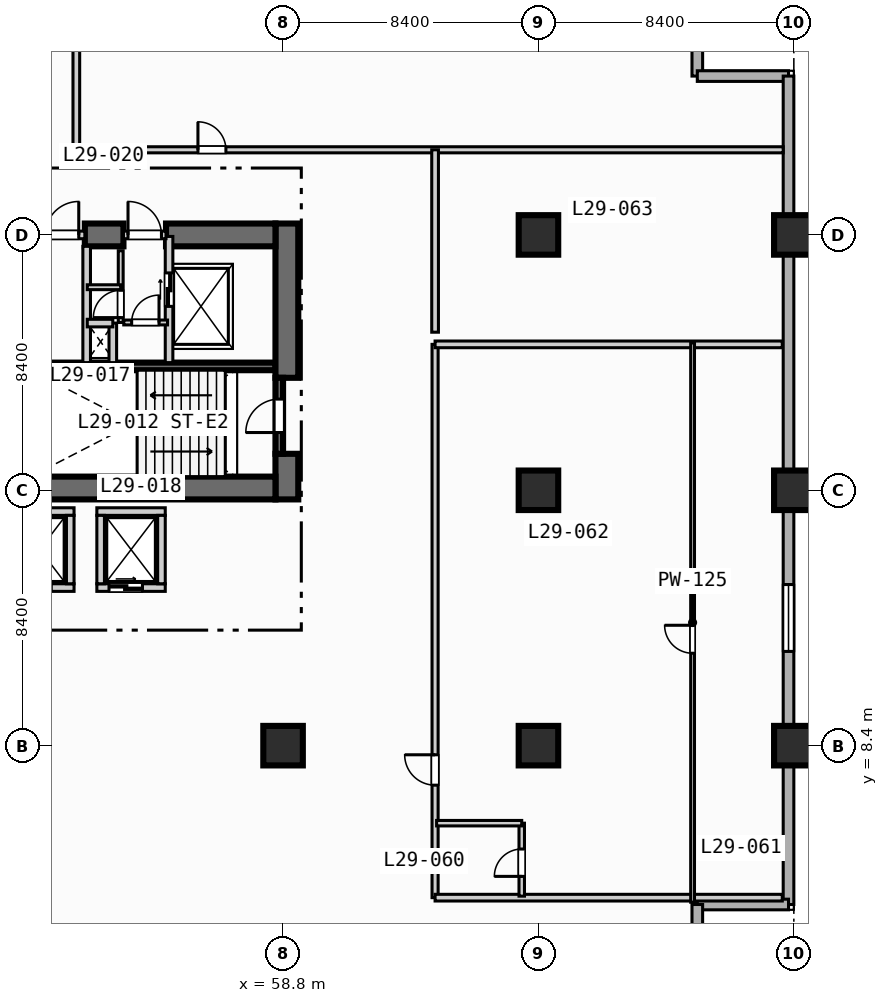
"""IFC4 building model, lengths in metres.
Left out: names, types, materials, properties, quantities, classifications, styles, units other than length and angle.
Written with IfcOpenShell. Run it as: python <this file> out.ifc"""

import sys

from ifc_helpers import new_model, si_unit, direction, frame, frame_2d, origin, origin_2d, place, context, subcontext, project, spatial, rectangle, extrude, element, fill, save


model = new_model("IFC4")
c1 = context("Model", 3, precision=1e-05, world=origin(), true_north=direction((0.0, 1.0)))
c2 = subcontext(c1, "Body", "Model", "MODEL_VIEW")
j1 = project(units=[si_unit("LENGTHUNIT", "METRE"), si_unit("PLANEANGLEUNIT", "RADIAN")], contexts=[c1])
p1 = place(None, origin())
s1 = spatial("IfcSite", under=j1, at=p1, CompositionType="ELEMENT")
p2 = place(p1, origin())
s2 = spatial("IfcBuilding", under=s1, at=p2, CompositionType="ELEMENT")
p3 = place(p2, frame((0.0, 0.0, 122.8)))
s3 = spatial("IfcBuildingStorey", under=s2, at=p3, CompositionType="ELEMENT", Elevation=122.8)
p4 = place(p3, frame((50.5, 20.875, 0.0), z_axis=(0.0, 0.0, 1.0), x_axis=(1.0, 0.0, 0.0)))
e1 = element("IfcWall", 1, at=p4, inside=s3, PredefinedType="SOLIDWALL", context=c2, shape_type="SweptSolid", body=[
    extrude(rectangle(XDim=8.05, YDim=0.25, at=frame_2d((4.025, 0.0))), origin(), (0.0, 0.0, 1.0), 3.55),
])
p5 = place(p3, frame((58.925, 16.5, 0.0), z_axis=(0.0, 0.0, 1.0), x_axis=(0.0, 1.0, 0.0)))
e2 = element("IfcWall", 2, at=p5, inside=s3, PredefinedType="SHEAR", context=c2, shape_type="SweptSolid", body=[
    extrude(rectangle(XDim=1.5, YDim=0.75, at=frame_2d((0.75, 0.0))), origin(), (0.0, 0.0, 1.0), 3.55),
])
p6 = place(p3, frame((58.925, 20.5, 0.0), z_axis=(0.0, 0.0, 1.0), x_axis=(0.0, 1.0, 0.0)))
e3 = element("IfcWall", 3, at=p6, inside=s3, PredefinedType="SHEAR", context=c2, shape_type="SweptSolid", body=[
    extrude(rectangle(XDim=5.075, YDim=0.75, at=frame_2d((2.538, 0.0))), origin(), (0.0, 0.0, 1.0), 3.55),
])
p7 = place(p3, frame((42.2, 16.875, 0.0), z_axis=(0.0, 0.0, 1.0), x_axis=(1.0, 0.0, 0.0)))
e4 = element("IfcWall", 4, at=p7, inside=s3, PredefinedType="SHEAR", context=c2, shape_type="SweptSolid", body=[
    extrude(rectangle(XDim=16.35, YDim=0.75, at=frame_2d((8.175, 0.0))), origin(), (0.0, 0.0, 1.0), 3.55),
])
p8 = place(p3, frame((52.28, 25.2, 0.0), z_axis=(0.0, 0.0, 1.0), x_axis=(1.0, 0.0, 0.0)))
e5 = element("IfcWall", 5, at=p8, inside=s3, PredefinedType="SHEAR", context=c2, shape_type="SweptSolid", body=[
    extrude(rectangle(XDim=1.27, YDim=0.75, at=frame_2d((0.635, 0.0))), origin(), (0.0, 0.0, 1.0), 3.55),
])
p9 = place(p3, frame((54.95, 25.2, 0.0), z_axis=(0.0, 0.0, 1.0), x_axis=(1.0, 0.0, 0.0)))
e6 = element("IfcWall", 6, at=p9, inside=s3, PredefinedType="SHEAR", context=c2, shape_type="SweptSolid", body=[
    extrude(rectangle(XDim=3.6, YDim=0.75, at=frame_2d((1.8, 0.0))), origin(), (0.0, 0.0, 1.0), 3.55),
])
for number, where, z_axis, x_axis in (
    (7, (58.8, 8.4, 0.0), (0.0, 0.0, 1.0), (1.0, 0.0, 0.0)),
    (8, (67.2, 8.4, 0.0), (0.0, 0.0, 1.0), (1.0, 0.0, 0.0)),
    (9, (67.2, 16.8, 0.0), (0.0, 0.0, 1.0), (1.0, 0.0, 0.0)),
    (10, (67.2, 25.2, 0.0), (0.0, 0.0, 1.0), (1.0, 0.0, 0.0)),
    (11, (75.6, 8.4, 0.0), (0.0, 0.0, 1.0), (1.0, 0.0, 0.0)),
    (12, (75.6, 16.8, 0.0), (0.0, 0.0, 1.0), (1.0, 0.0, 0.0)),
    (13, (75.6, 25.2, 0.0), (0.0, 0.0, 1.0), (1.0, 0.0, 0.0)),
):
    element("IfcColumn", number, at=place(p3, frame(where, z_axis=z_axis, x_axis=x_axis)), inside=s3, PredefinedType="COLUMN", context=c2, shape_type="SweptSolid", body=[
        extrude(rectangle(XDim=1.3, YDim=1.3, at=origin_2d()), origin(), (0.0, 0.0, 1.0), 3.8),
    ])
for number, where, z_axis, x_axis in (
    (14, (72.425, 33.425, 0.0), (0.0, 0.0, 1.0), (0.0, -1.0, 0.0)),
    (15, (72.425, 30.425, 0.0), (0.0, 0.0, 1.0), (1.0, 0.0, 0.0)),
):
    element("IfcWall", number, at=place(p3, frame(where, z_axis=z_axis, x_axis=x_axis)), inside=s3, PredefinedType="STANDARD", context=c2, shape_type="SweptSolid", body=[
        extrude(rectangle(XDim=3.0, YDim=0.35, at=frame_2d((1.5, 0.0))), origin(), (0.0, 0.0, 1.0), 3.55),
    ])
p10 = place(p3, frame((75.425, 30.425, 0.0), z_axis=(0.0, 0.0, 1.0), x_axis=(0.0, -1.0, 0.0)))
e16 = element("IfcWall", 16, at=p10, inside=s3, PredefinedType="STANDARD", context=c2, shape_type="SweptSolid", body=[
    extrude(rectangle(XDim=27.25, YDim=0.35, at=frame_2d((13.625, 0.0))), origin(), (0.0, 0.0, 1.0), 3.55),
])
p11 = place(p10, frame((16.725, 0.0, 0.85)))
e17 = element("IfcOpeningElement", 17, at=p11, cuts=e16, PredefinedType="OPENING", context=c2, shape_type="SweptSolid", body=[
    extrude(rectangle(XDim=2.2, YDim=1.8, at=frame_2d((1.1, 0.9))), frame((0.0, 0.185, 0.0), z_axis=(0.0, -1.0, 0.0), x_axis=(1.0, 0.0, 0.0)), (0.0, 0.0, 1.0), 0.37),
])
for number, where, z_axis, x_axis in (
    (18, (75.425, 3.175, 0.0), (0.0, 0.0, 1.0), (-1.0, 0.0, 0.0)),
    (19, (72.425, 3.175, 0.0), (0.0, 0.0, 1.0), (0.0, -1.0, 0.0)),
):
    element("IfcWall", number, at=place(p3, frame(where, z_axis=z_axis, x_axis=x_axis)), inside=s3, PredefinedType="STANDARD", context=c2, shape_type="SweptSolid", body=[
        extrude(rectangle(XDim=3.0, YDim=0.35, at=frame_2d((1.5, 0.0))), origin(), (0.0, 0.0, 1.0), 3.55),
    ])
p12 = place(p3, frame((58.675, 18.0, 0.0), z_axis=(0.0, 0.0, 1.0), x_axis=(0.0, 1.0, 0.0)))
e20 = element("IfcWall", 20, at=p12, inside=s3, PredefinedType="SOLIDWALL", context=c2, shape_type="SweptSolid", body=[
    extrude(rectangle(XDim=2.5, YDim=0.25, at=frame_2d((1.25, 0.0))), origin(), (0.0, 0.0, 1.0), 3.55),
])
p13 = place(p12, frame((0.7, 0.0, 0.0)))
e21 = element("IfcOpeningElement", 21, at=p13, cuts=e20, PredefinedType="OPENING", context=c2, shape_type="SweptSolid", body=[
    extrude(rectangle(XDim=1.1, YDim=2.15, at=frame_2d((0.55, 1.075))), frame((0.0, 0.135, 0.0), z_axis=(0.0, -1.0, 0.0), x_axis=(1.0, 0.0, 0.0)), (0.0, 0.0, 1.0), 0.27),
])
p14 = place(p3, frame((50.8, 25.2, 0.0), z_axis=(0.0, 0.0, 1.0), x_axis=(1.0, 0.0, 0.0)))
e22 = element("IfcWall", 22, at=p14, inside=s3, PredefinedType="SOLIDWALL", context=c2, shape_type="SweptSolid", body=[
    extrude(rectangle(XDim=1.48, YDim=0.25, at=frame_2d((0.74, 0.0))), origin(), (0.0, 0.0, 1.0), 3.55),
])
p15 = place(p14, frame((0.18, 0.0, 0.0)))
e23 = element("IfcOpeningElement", 23, at=p15, cuts=e22, PredefinedType="OPENING", context=c2, shape_type="SweptSolid", body=[
    extrude(rectangle(XDim=1.1, YDim=2.15, at=frame_2d((0.55, 1.075))), frame((0.0, 0.135, 0.0), z_axis=(0.0, -1.0, 0.0), x_axis=(1.0, 0.0, 0.0)), (0.0, 0.0, 1.0), 0.27),
])
p16 = place(p3, frame((52.34, 21.0, 0.0), z_axis=(0.0, 0.0, 1.0), x_axis=(0.0, 1.0, 0.0)))
e24 = element("IfcWall", 24, at=p16, inside=s3, PredefinedType="SOLIDWALL", context=c2, shape_type="SweptSolid", body=[
    extrude(rectangle(XDim=3.825, YDim=0.25, at=frame_2d((1.913, 0.0))), origin(), (0.0, 0.0, 1.0), 3.55),
])
p17 = place(p3, frame((55.05, 21.0, 0.0), z_axis=(0.0, 0.0, 1.0), x_axis=(0.0, 1.0, 0.0)))
e25 = element("IfcWall", 25, at=p17, inside=s3, PredefinedType="SOLIDWALL", context=c2, shape_type="SweptSolid", body=[
    extrude(rectangle(XDim=4.15, YDim=0.25, at=frame_2d((2.075, 0.0))), origin(), (0.0, 0.0, 1.0), 3.55),
])
p18 = place(p17, frame((1.85, 0.0, 0.0)))
e26 = element("IfcOpeningElement", 26, at=p18, cuts=e25, PredefinedType="OPENING", context=c2, shape_type="SweptSolid", body=[
    extrude(rectangle(XDim=1.1, YDim=2.15, at=frame_2d((0.55, 1.075))), frame((0.0, 0.135, 0.0), z_axis=(0.0, -1.0, 0.0), x_axis=(1.0, 0.0, 0.0)), (0.0, 0.0, 1.0), 0.27),
])
p19 = place(p3, frame((53.55, 25.2, 0.0), z_axis=(0.0, 0.0, 1.0), x_axis=(1.0, 0.0, 0.0)))
e27 = element("IfcWall", 27, at=p19, inside=s3, PredefinedType="SOLIDWALL", context=c2, shape_type="SweptSolid", body=[
    extrude(rectangle(XDim=1.4, YDim=0.25, at=frame_2d((0.7, 0.0))), origin(), (0.0, 0.0, 1.0), 3.55),
])
p20 = place(p19, frame((0.15, 0.0, 0.0)))
e28 = element("IfcOpeningElement", 28, at=p20, cuts=e27, PredefinedType="OPENING", context=c2, shape_type="SweptSolid", body=[
    extrude(rectangle(XDim=1.1, YDim=2.15, at=frame_2d((0.55, 1.075))), frame((0.0, 0.135, 0.0), z_axis=(0.0, -1.0, 0.0), x_axis=(1.0, 0.0, 0.0)), (0.0, 0.0, 1.0), 0.27),
])
p21 = place(p3, frame((53.2, 21.0, 0.0), z_axis=(0.0, 0.0, 1.0), x_axis=(0.0, 1.0, 0.0)))
e29 = element("IfcWall", 29, at=p21, inside=s3, PredefinedType="SOLIDWALL", context=c2, shape_type="SweptSolid", body=[
    extrude(rectangle(XDim=1.3, YDim=0.25, at=frame_2d((0.65, 0.0))), origin(), (0.0, 0.0, 1.0), 3.55),
])
p22 = place(p3, frame((52.36, 22.3, 0.0), z_axis=(0.0, 0.0, 1.0), x_axis=(1.0, 0.0, 0.0)))
e30 = element("IfcWall", 30, at=p22, inside=s3, PredefinedType="SOLIDWALL", context=c2, shape_type="SweptSolid", body=[
    extrude(rectangle(XDim=0.84, YDim=0.25, at=frame_2d((0.42, 0.0))), origin(), (0.0, 0.0, 1.0), 3.55),
])
p23 = place(p3, frame((53.56, 22.32, 0.0), z_axis=(0.0, 0.0, 1.0), x_axis=(1.0, 0.0, 0.0)))
e31 = element("IfcWall", 31, at=p23, inside=s3, PredefinedType="PARTITIONING", context=c2, shape_type="SweptSolid", body=[
    extrude(rectangle(XDim=1.44, YDim=0.16, at=frame_2d((0.72, 0.0))), origin(), (0.0, 0.0, 1.0), 3.55),
])
p24 = place(p23, frame((0.26, 0.0, 0.0)))
e32 = element("IfcOpeningElement", 32, at=p24, cuts=e31, PredefinedType="OPENING", context=c2, shape_type="SweptSolid", body=[
    extrude(rectangle(XDim=0.9, YDim=2.1, at=frame_2d((0.45, 1.05))), frame((0.0, 0.09, 0.0), z_axis=(0.0, -1.0, 0.0), x_axis=(1.0, 0.0, 0.0)), (0.0, 0.0, 1.0), 0.18),
])
p25 = place(p3, frame((53.46, 22.32, 0.0), z_axis=(0.0, 0.0, 1.0), x_axis=(0.0, 1.0, 0.0)))
e33 = element("IfcWall", 33, at=p25, inside=s3, PredefinedType="PARTITIONING", context=c2, shape_type="SweptSolid", body=[
    extrude(rectangle(XDim=2.36, YDim=0.16, at=frame_2d((1.18, 0.0))), origin(), (0.0, 0.0, 1.0), 3.55),
])
p26 = place(p25, frame((0.16, 0.0, 0.0)))
e34 = element("IfcOpeningElement", 34, at=p26, cuts=e33, PredefinedType="OPENING", context=c2, shape_type="SweptSolid", body=[
    extrude(rectangle(XDim=0.9, YDim=2.1, at=frame_2d((0.45, 1.05))), frame((0.0, 0.09, 0.0), z_axis=(0.0, -1.0, 0.0), x_axis=(1.0, 0.0, 0.0)), (0.0, 0.0, 1.0), 0.18),
])
p27 = place(p3, frame((52.36, 23.48, 0.0), z_axis=(0.0, 0.0, 1.0), x_axis=(1.0, 0.0, 0.0)))
e35 = element("IfcWall", 35, at=p27, inside=s3, PredefinedType="PARTITIONING", context=c2, shape_type="SweptSolid", body=[
    extrude(rectangle(XDim=1.1, YDim=0.16, at=frame_2d((0.55, 0.0))), origin(), (0.0, 0.0, 1.0), 3.55),
])
p28 = place(p3, frame((49.675, 13.6, 0.0), z_axis=(0.0, 0.0, 1.0), x_axis=(1.0, 0.0, 0.0)))
e36 = element("IfcWall", 36, at=p28, inside=s3, PredefinedType="SOLIDWALL", context=c2, shape_type="SweptSolid", body=[
    extrude(rectangle(XDim=2.25, YDim=0.25, at=frame_2d((1.125, 0.0))), origin(), (0.0, 0.0, 1.0), 3.55),
])
p29 = place(p28, frame((0.4, 0.0, 0.0)))
e37 = element("IfcOpeningElement", 37, at=p29, cuts=e36, PredefinedType="OPENING", context=c2, shape_type="SweptSolid", body=[
    extrude(rectangle(XDim=1.1, YDim=2.15, at=frame_2d((0.55, 1.075))), frame((0.0, 0.135, 0.0), z_axis=(0.0, -1.0, 0.0), x_axis=(1.0, 0.0, 0.0)), (0.0, 0.0, 1.0), 0.27),
])
for number, where, z_axis, x_axis in (
    (38, (49.675, 16.1, 0.0), (0.0, 0.0, 1.0), (1.0, 0.0, 0.0)),
    (39, (51.8, 13.725, 0.0), (0.0, 0.0, 1.0), (0.0, 1.0, 0.0)),
):
    element("IfcWall", number, at=place(p3, frame(where, z_axis=z_axis, x_axis=x_axis)), inside=s3, PredefinedType="SOLIDWALL", context=c2, shape_type="SweptSolid", body=[
        extrude(rectangle(XDim=2.25, YDim=0.25, at=frame_2d((1.125, 0.0))), origin(), (0.0, 0.0, 1.0), 3.55),
    ])
p30 = place(p3, frame((52.675, 13.6, 0.0), z_axis=(0.0, 0.0, 1.0), x_axis=(1.0, 0.0, 0.0)))
e40 = element("IfcWall", 40, at=p30, inside=s3, PredefinedType="SOLIDWALL", context=c2, shape_type="SweptSolid", body=[
    extrude(rectangle(XDim=2.25, YDim=0.25, at=frame_2d((1.125, 0.0))), origin(), (0.0, 0.0, 1.0), 3.55),
])
p31 = place(p30, frame((0.4, 0.0, 0.0)))
e41 = element("IfcOpeningElement", 41, at=p31, cuts=e40, PredefinedType="OPENING", context=c2, shape_type="SweptSolid", body=[
    extrude(rectangle(XDim=1.1, YDim=2.15, at=frame_2d((0.55, 1.075))), frame((0.0, 0.135, 0.0), z_axis=(0.0, -1.0, 0.0), x_axis=(1.0, 0.0, 0.0)), (0.0, 0.0, 1.0), 0.27),
])
for number, where, z_axis, x_axis in (
    (42, (52.675, 16.1, 0.0), (0.0, 0.0, 1.0), (1.0, 0.0, 0.0)),
    (43, (52.8, 13.725, 0.0), (0.0, 0.0, 1.0), (0.0, 1.0, 0.0)),
    (44, (54.8, 13.725, 0.0), (0.0, 0.0, 1.0), (0.0, 1.0, 0.0)),
):
    element("IfcWall", number, at=place(p3, frame(where, z_axis=z_axis, x_axis=x_axis)), inside=s3, PredefinedType="SOLIDWALL", context=c2, shape_type="SweptSolid", body=[
        extrude(rectangle(XDim=2.25, YDim=0.25, at=frame_2d((1.125, 0.0))), origin(), (0.0, 0.0, 1.0), 3.55),
    ])
p32 = place(p3, frame((63.8, 3.4, 0.0), z_axis=(0.0, 0.0, 1.0), x_axis=(0.0, 1.0, 0.0)))
e45 = element("IfcWall", 45, at=p32, inside=s3, PredefinedType="PARTITIONING", context=c2, shape_type="SweptSolid", body=[
    extrude(rectangle(XDim=18.2, YDim=0.2, at=frame_2d((9.1, 0.0))), origin(), (0.0, 0.0, 1.0), 3.55),
])
p33 = place(p32, frame((3.7, 0.0, 0.0)))
e46 = element("IfcOpeningElement", 46, at=p33, cuts=e45, PredefinedType="OPENING", context=c2, shape_type="SweptSolid", body=[
    extrude(rectangle(XDim=1.0, YDim=2.15, at=frame_2d((0.5, 1.075))), frame((0.0, 0.11, 0.0), z_axis=(0.0, -1.0, 0.0), x_axis=(1.0, 0.0, 0.0)), (0.0, 0.0, 1.0), 0.22),
])
for number, where, z_axis, x_axis in (
    (47, (63.8, 3.4, 0.0), (0.0, 0.0, 1.0), (1.0, 0.0, 0.0)),
    (48, (63.8, 21.6, 0.0), (0.0, 0.0, 1.0), (1.0, 0.0, 0.0)),
):
    element("IfcWall", number, at=place(p3, frame(where, z_axis=z_axis, x_axis=x_axis)), inside=s3, PredefinedType="PARTITIONING", context=c2, shape_type="SweptSolid", body=[
        extrude(rectangle(XDim=11.42, YDim=0.22, at=frame_2d((5.71, 0.0))), origin(), (0.0, 0.0, 1.0), 3.55),
    ])
p34 = place(p3, frame((66.65, 3.45, 0.0), z_axis=(0.0, 0.0, 1.0), x_axis=(0.0, 1.0, 0.0)))
e49 = element("IfcWall", 49, at=p34, inside=s3, PredefinedType="PLUMBINGWALL", context=c2, shape_type="SweptSolid", body=[
    extrude(rectangle(XDim=2.4, YDim=0.18, at=frame_2d((1.2, 0.0))), origin(), (0.0, 0.0, 1.0), 3.55),
])
p35 = place(p34, frame((0.65, 0.0, 0.0)))
e50 = element("IfcOpeningElement", 50, at=p35, cuts=e49, PredefinedType="OPENING", context=c2, shape_type="SweptSolid", body=[
    extrude(rectangle(XDim=0.9, YDim=2.1, at=frame_2d((0.45, 1.05))), frame((0.0, 0.1, 0.0), z_axis=(0.0, -1.0, 0.0), x_axis=(1.0, 0.0, 0.0)), (0.0, 0.0, 1.0), 0.2),
])
p36 = place(p3, frame((63.85, 5.85, 0.0), z_axis=(0.0, 0.0, 1.0), x_axis=(1.0, 0.0, 0.0)))
e51 = element("IfcWall", 51, at=p36, inside=s3, PredefinedType="PLUMBINGWALL", context=c2, shape_type="SweptSolid", body=[
    extrude(rectangle(XDim=2.8, YDim=0.18, at=frame_2d((1.4, 0.0))), origin(), (0.0, 0.0, 1.0), 3.55),
])
p37 = place(p3, frame((72.27, 3.25, 0.0), z_axis=(0.0, 0.0, 1.0), x_axis=(0.0, 1.0, 0.0)))
e52 = element("IfcWall", 52, at=p37, inside=s3, PredefinedType="PARTITIONING", context=c2, shape_type="SweptSolid", body=[
    extrude(rectangle(XDim=18.4, YDim=0.125, at=frame_2d((9.2, 0.0))), origin(), (0.0, 0.0, 1.0), 3.55),
])
p38 = place(p37, frame((8.19, 0.0, 0.0)))
e53 = element("IfcOpeningElement", 53, at=p38, cuts=e52, PredefinedType="OPENING", context=c2, shape_type="SweptSolid", body=[
    extrude(rectangle(XDim=0.92, YDim=2.1, at=frame_2d((0.46, 1.05))), frame((0.0, 0.073, 0.0), z_axis=(0.0, -1.0, 0.0), x_axis=(1.0, 0.0, 0.0)), (0.0, 0.0, 1.0), 0.145),
])
p39 = place(p3, frame((52.0, 28.0, 0.0), z_axis=(0.0, 0.0, 1.0), x_axis=(1.0, 0.0, 0.0)))
e54 = element("IfcWall", 54, at=p39, inside=s3, PredefinedType="PARTITIONING", context=c2, shape_type="SweptSolid", body=[
    extrude(rectangle(XDim=23.25, YDim=0.2, at=frame_2d((11.625, 0.0))), origin(), (0.0, 0.0, 1.0), 3.55),
])
p40 = place(p39, frame((4.0, 0.0, 0.0)))
e55 = element("IfcOpeningElement", 55, at=p40, cuts=e54, PredefinedType="OPENING", context=c2, shape_type="SweptSolid", body=[
    extrude(rectangle(XDim=0.92, YDim=2.1, at=frame_2d((0.46, 1.05))), frame((0.0, 0.11, 0.0), z_axis=(0.0, -1.0, 0.0), x_axis=(1.0, 0.0, 0.0)), (0.0, 0.0, 1.0), 0.22),
])
p41 = place(p3, frame((52.0, 28.0, 0.0), z_axis=(0.0, 0.0, 1.0), x_axis=(0.0, 1.0, 0.0)))
e56 = element("IfcWall", 56, at=p41, inside=s3, PredefinedType="PARTITIONING", context=c2, shape_type="SweptSolid", body=[
    extrude(rectangle(XDim=5.3, YDim=0.22, at=frame_2d((2.65, 0.0))), origin(), (0.0, 0.0, 1.0), 3.55),
])
p42 = place(p3, frame((63.8, 22.0, 0.0), z_axis=(0.0, 0.0, 1.0), x_axis=(0.0, 1.0, 0.0)))
e57 = element("IfcWall", 57, at=p42, inside=s3, PredefinedType="PARTITIONING", context=c2, shape_type="SweptSolid", body=[
    extrude(rectangle(XDim=6.0, YDim=0.22, at=frame_2d((3.0, 0.0))), origin(), (0.0, 0.0, 1.0), 3.55),
])
p43 = place(p11, origin())
e58 = element("IfcWindow", 58, at=p43, inside=s3, PartitioningType="SINGLE_PANEL", PredefinedType="WINDOW", context=c2, shape_type="SweptSolid", body=[
    extrude(rectangle(XDim=2.2, YDim=1.8, at=frame_2d((1.1, 0.9))), frame((0.0, 0.03, 0.0), z_axis=(0.0, -1.0, 0.0), x_axis=(1.0, 0.0, 0.0)), (0.0, 0.0, 1.0), 0.06),
])
fill(e17, e58)
p44 = place(p13, origin())
e59 = element("IfcDoor", 59, at=p44, inside=s3, OperationType="SINGLE_SWING_LEFT", PredefinedType="DOOR", context=c2, shape_type="SweptSolid", body=[
    extrude(rectangle(XDim=1.1, YDim=2.15, at=frame_2d((0.55, 1.075))), frame((0.0, 0.025, 0.0), z_axis=(0.0, -1.0, 0.0), x_axis=(1.0, 0.0, 0.0)), (0.0, 0.0, 1.0), 0.05),
])
fill(e21, e59)
p45 = place(p15, origin())
e60 = element("IfcDoor", 60, at=p45, inside=s3, OperationType="SINGLE_SWING_RIGHT", PredefinedType="DOOR", context=c2, shape_type="SweptSolid", body=[
    extrude(rectangle(XDim=1.1, YDim=2.15, at=frame_2d((0.55, 1.075))), frame((0.0, 0.025, 0.0), z_axis=(0.0, -1.0, 0.0), x_axis=(1.0, 0.0, 0.0)), (0.0, 0.0, 1.0), 0.05),
])
fill(e23, e60)
p46 = place(p18, origin())
e61 = element("IfcDoor", 61, at=p46, inside=s3, OperationType="SLIDING_TO_LEFT", PredefinedType="DOOR", context=c2, shape_type="SweptSolid", body=[
    extrude(rectangle(XDim=1.1, YDim=2.15, at=frame_2d((0.55, 1.075))), frame((0.0, 0.025, 0.0), z_axis=(0.0, -1.0, 0.0), x_axis=(1.0, 0.0, 0.0)), (0.0, 0.0, 1.0), 0.05),
])
fill(e26, e61)
p47 = place(p20, origin())
e62 = element("IfcDoor", 62, at=p47, inside=s3, OperationType="SINGLE_SWING_LEFT", PredefinedType="DOOR", context=c2, shape_type="SweptSolid", body=[
    extrude(rectangle(XDim=1.1, YDim=2.15, at=frame_2d((0.55, 1.075))), frame((0.0, 0.025, 0.0), z_axis=(0.0, -1.0, 0.0), x_axis=(1.0, 0.0, 0.0)), (0.0, 0.0, 1.0), 0.05),
])
fill(e28, e62)
p48 = place(p24, origin())
e63 = element("IfcDoor", 63, at=p48, inside=s3, OperationType="SINGLE_SWING_RIGHT", PredefinedType="DOOR", context=c2, shape_type="SweptSolid", body=[
    extrude(rectangle(XDim=0.9, YDim=2.1, at=frame_2d((0.45, 1.05))), frame((0.0, 0.025, 0.0), z_axis=(0.0, -1.0, 0.0), x_axis=(1.0, 0.0, 0.0)), (0.0, 0.0, 1.0), 0.05),
])
fill(e32, e63)
p49 = place(p26, origin())
e64 = element("IfcDoor", 64, at=p49, inside=s3, OperationType="SINGLE_SWING_LEFT", PredefinedType="DOOR", context=c2, shape_type="SweptSolid", body=[
    extrude(rectangle(XDim=0.9, YDim=2.1, at=frame_2d((0.45, 1.05))), frame((0.0, 0.025, 0.0), z_axis=(0.0, -1.0, 0.0), x_axis=(1.0, 0.0, 0.0)), (0.0, 0.0, 1.0), 0.05),
])
fill(e34, e64)
p50 = place(p31, origin())
e65 = element("IfcDoor", 65, at=p50, inside=s3, OperationType="SLIDING_TO_LEFT", PredefinedType="DOOR", context=c2, shape_type="SweptSolid", body=[
    extrude(rectangle(XDim=1.1, YDim=2.15, at=frame_2d((0.55, 1.075))), frame((0.0, 0.025, 0.0), z_axis=(0.0, -1.0, 0.0), x_axis=(1.0, 0.0, 0.0)), (0.0, 0.0, 1.0), 0.05),
])
fill(e41, e65)
p51 = place(p33, origin())
e66 = element("IfcDoor", 66, at=p51, inside=s3, OperationType="SINGLE_SWING_RIGHT", PredefinedType="DOOR", context=c2, shape_type="SweptSolid", body=[
    extrude(rectangle(XDim=1.0, YDim=2.15, at=frame_2d((0.5, 1.075))), frame((0.0, 0.025, 0.0), z_axis=(0.0, -1.0, 0.0), x_axis=(1.0, 0.0, 0.0)), (0.0, 0.0, 1.0), 0.05),
])
fill(e46, e66)
p52 = place(p35, origin())
e67 = element("IfcDoor", 67, at=p52, inside=s3, OperationType="SINGLE_SWING_LEFT", PredefinedType="DOOR", context=c2, shape_type="SweptSolid", body=[
    extrude(rectangle(XDim=0.9, YDim=2.1, at=frame_2d((0.45, 1.05))), frame((0.0, 0.025, 0.0), z_axis=(0.0, -1.0, 0.0), x_axis=(1.0, 0.0, 0.0)), (0.0, 0.0, 1.0), 0.05),
])
fill(e50, e67)
p53 = place(p38, origin())
e68 = element("IfcDoor", 68, at=p53, inside=s3, OperationType="SINGLE_SWING_RIGHT", PredefinedType="DOOR", context=c2, shape_type="SweptSolid", body=[
    extrude(rectangle(XDim=0.92, YDim=2.1, at=frame_2d((0.46, 1.05))), frame((0.0, 0.025, 0.0), z_axis=(0.0, -1.0, 0.0), x_axis=(1.0, 0.0, 0.0)), (0.0, 0.0, 1.0), 0.05),
])
fill(e53, e68)
p54 = place(p40, origin())
e69 = element("IfcDoor", 69, at=p54, inside=s3, OperationType="SINGLE_SWING_LEFT", PredefinedType="DOOR", context=c2, shape_type="SweptSolid", body=[
    extrude(rectangle(XDim=0.92, YDim=2.1, at=frame_2d((0.46, 1.05))), frame((0.0, 0.025, 0.0), z_axis=(0.0, -1.0, 0.0), x_axis=(1.0, 0.0, 0.0)), (0.0, 0.0, 1.0), 0.05),
])
fill(e55, e69)
save(model, sys.argv[1])
